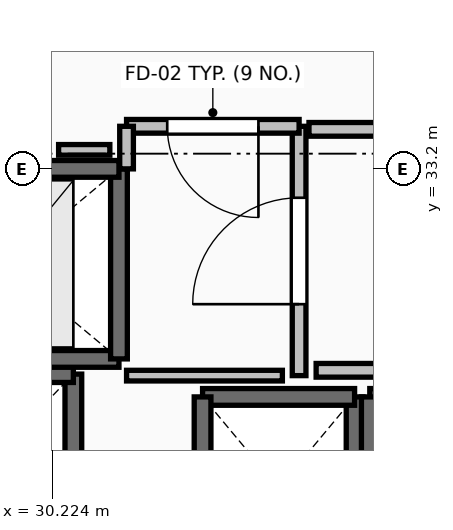
"""IFC4 building model, lengths in metres.
Left out: names, types, materials, properties, quantities, classifications, styles, units other than length and angle.
Written with IfcOpenShell. Run it as: python <this file> out.ifc"""

import sys

from ifc_helpers import new_model, si_unit, direction, frame, frame_2d, origin, place, context, subcontext, project, spatial, rectangle, extrude, element, fill, save


model = new_model("IFC4")
c1 = context("Model", 3, precision=1e-05, world=origin(), true_north=direction((0.0, 1.0)))
c2 = subcontext(c1, "Body", "Model", "MODEL_VIEW")
j1 = project(units=[si_unit("LENGTHUNIT", "METRE"), si_unit("PLANEANGLEUNIT", "RADIAN")], contexts=[c1])
p1 = place(None, origin())
s1 = spatial("IfcSite", under=j1, at=p1, CompositionType="ELEMENT")
p2 = place(p1, origin())
s2 = spatial("IfcBuilding", under=s1, at=p2, CompositionType="ELEMENT")
p3 = place(p2, frame((0.0, 0.0, 124.3)))
s3 = spatial("IfcBuildingStorey", under=s2, at=p3, CompositionType="ELEMENT", Elevation=124.3)
p4 = place(p3, frame((34.2, 27.8, 0.0), z_axis=(0.0, 0.0, 1.0), x_axis=(0.0, 1.0, 0.0)))
e1 = element("IfcWall", 1, at=p4, inside=s3, PredefinedType="SOLIDWALL", context=c2, shape_type="SweptSolid", body=[
    extrude(rectangle(XDim=2.4, YDim=0.22, at=frame_2d((1.2, 0.0))), origin(), (0.0, 0.0, 1.0), 4.54),
])
p5 = place(p3, frame((34.2, 30.2, 0.0), z_axis=(0.0, 0.0, 1.0), x_axis=(-1.0, 0.0, 0.0)))
e2 = element("IfcWall", 2, at=p5, inside=s3, PredefinedType="SOLIDWALL", context=c2, shape_type="SweptSolid", body=[
    extrude(rectangle(XDim=2.0, YDim=0.22, at=frame_2d((1.0, 0.0))), origin(), (0.0, 0.0, 1.0), 4.54),
])
p6 = place(p3, frame((32.2, 30.2, 0.0), z_axis=(0.0, 0.0, 1.0), x_axis=(0.0, -1.0, 0.0)))
e3 = element("IfcWall", 3, at=p6, inside=s3, PredefinedType="SOLIDWALL", context=c2, shape_type="SweptSolid", body=[
    extrude(rectangle(XDim=2.4, YDim=0.22, at=frame_2d((1.2, 0.0))), origin(), (0.0, 0.0, 1.0), 4.54),
])
p7 = place(p3, frame((36.4, 30.2, 0.0), z_axis=(0.0, 0.0, 1.0), x_axis=(-1.0, 0.0, 0.0)))
e4 = element("IfcWall", 4, at=p7, inside=s3, PredefinedType="SOLIDWALL", context=c2, shape_type="SweptSolid", body=[
    extrude(rectangle(XDim=2.0, YDim=0.22, at=frame_2d((1.0, 0.0))), origin(), (0.0, 0.0, 1.0), 4.54),
])
p8 = place(p3, frame((34.4, 30.2, 0.0), z_axis=(0.0, 0.0, 1.0), x_axis=(0.0, -1.0, 0.0)))
e5 = element("IfcWall", 5, at=p8, inside=s3, PredefinedType="SOLIDWALL", context=c2, shape_type="SweptSolid", body=[
    extrude(rectangle(XDim=2.4, YDim=0.22, at=frame_2d((1.2, 0.0))), origin(), (0.0, 0.0, 1.0), 4.54),
])
p9 = place(p3, frame((30.5, 28.0, 0.0), z_axis=(0.0, 0.0, 1.0), x_axis=(0.0, 1.0, 0.0)))
e6 = element("IfcWall", 6, at=p9, inside=s3, PredefinedType="SHEAR", context=c2, shape_type="SweptSolid", body=[
    extrude(rectangle(XDim=2.5, YDim=0.22, at=frame_2d((1.25, 0.0))), origin(), (0.0, 0.0, 1.0), 4.54),
])
p10 = place(p3, frame((30.5, 30.5, 0.0), z_axis=(0.0, 0.0, 1.0), x_axis=(-1.0, 0.0, 0.0)))
e7 = element("IfcWall", 7, at=p10, inside=s3, PredefinedType="SHEAR", context=c2, shape_type="SweptSolid", body=[
    extrude(rectangle(XDim=2.4, YDim=0.22, at=frame_2d((1.2, 0.0))), origin(), (0.0, 0.0, 1.0), 4.54),
])
p11 = place(p3, frame((28.1, 30.7, 0.0), z_axis=(0.0, 0.0, 1.0), x_axis=(1.0, 0.0, 0.0)))
e8 = element("IfcWall", 8, at=p11, inside=s3, PredefinedType="SOLIDWALL", context=c2, shape_type="SweptSolid", body=[
    extrude(rectangle(XDim=3.0, YDim=0.22, at=frame_2d((1.5, 0.0))), origin(), (0.0, 0.0, 1.0), 4.54),
])
p12 = place(p3, frame((31.1, 30.7, 0.0), z_axis=(0.0, 0.0, 1.0), x_axis=(0.0, 1.0, 0.0)))
e9 = element("IfcWall", 9, at=p12, inside=s3, PredefinedType="SOLIDWALL", context=c2, shape_type="SweptSolid", body=[
    extrude(rectangle(XDim=2.5, YDim=0.22, at=frame_2d((1.25, 0.0))), origin(), (0.0, 0.0, 1.0), 4.54),
])
p13 = place(p3, frame((31.1, 33.2, 0.0), z_axis=(0.0, 0.0, 1.0), x_axis=(-1.0, 0.0, 0.0)))
e10 = element("IfcWall", 10, at=p13, inside=s3, PredefinedType="SOLIDWALL", context=c2, shape_type="SweptSolid", body=[
    extrude(rectangle(XDim=3.0, YDim=0.22, at=frame_2d((1.5, 0.0))), origin(), (0.0, 0.0, 1.0), 4.54),
])
p14 = place(p13, frame((0.9, 0.0, 0.0)))
e11 = element("IfcOpeningElement", 11, at=p14, cuts=e10, PredefinedType="OPENING", context=c2, shape_type="SweptSolid", body=[
    extrude(rectangle(XDim=1.2, YDim=2.2, at=frame_2d((0.6, 1.1))), frame((0.0, 0.125, 0.0), z_axis=(0.0, -1.0, 0.0), x_axis=(1.0, 0.0, 0.0)), (0.0, 0.0, 1.0), 0.25),
])
p15 = place(p3, frame((33.47, 30.48, 0.0), z_axis=(0.0, 0.0, 1.0), x_axis=(0.0, 1.0, 0.0)))
e12 = element("IfcWall", 12, at=p15, inside=s3, PredefinedType="PARTITIONING", context=c2, shape_type="SweptSolid", body=[
    extrude(rectangle(XDim=3.28, YDim=0.18, at=frame_2d((1.64, 0.0))), origin(), (0.0, 0.0, 1.0), 4.54),
])
p16 = place(p15, frame((0.94, 0.0, 0.0)))
e13 = element("IfcOpeningElement", 13, at=p16, cuts=e12, PredefinedType="OPENING", context=c2, shape_type="SweptSolid", body=[
    extrude(rectangle(XDim=1.4, YDim=2.2, at=frame_2d((0.7, 1.1))), frame((0.0, 0.105, 0.0), z_axis=(0.0, -1.0, 0.0), x_axis=(1.0, 0.0, 0.0)), (0.0, 0.0, 1.0), 0.21),
])
p17 = place(p3, frame((33.47, 33.76, 0.0), z_axis=(0.0, 0.0, 1.0), x_axis=(-1.0, 0.0, 0.0)))
e14 = element("IfcWall", 14, at=p17, inside=s3, PredefinedType="PARTITIONING", context=c2, shape_type="SweptSolid", body=[
    extrude(rectangle(XDim=2.27, YDim=0.18, at=frame_2d((1.135, 0.0))), origin(), (0.0, 0.0, 1.0), 4.54),
])
p18 = place(p17, frame((0.535, 0.0, 0.0)))
e15 = element("IfcOpeningElement", 15, at=p18, cuts=e14, PredefinedType="OPENING", context=c2, shape_type="SweptSolid", body=[
    extrude(rectangle(XDim=1.2, YDim=2.15, at=frame_2d((0.6, 1.075))), frame((0.0, 0.105, 0.0), z_axis=(0.0, -1.0, 0.0), x_axis=(1.0, 0.0, 0.0)), (0.0, 0.0, 1.0), 0.21),
])
p19 = place(p3, frame((31.2, 33.76, 0.0), z_axis=(0.0, 0.0, 1.0), x_axis=(0.0, -1.0, 0.0)))
e16 = element("IfcWall", 16, at=p19, inside=s3, PredefinedType="PARTITIONING", context=c2, shape_type="SweptSolid", body=[
    extrude(rectangle(XDim=0.56, YDim=0.18, at=frame_2d((0.28, 0.0))), origin(), (0.0, 0.0, 1.0), 4.54),
])
p20 = place(p3, frame((38.8, 33.72, 0.0), z_axis=(0.0, 0.0, 1.0), x_axis=(-1.0, 0.0, 0.0)))
e17 = element("IfcWall", 17, at=p20, inside=s3, PredefinedType="PARTITIONING", context=c2, shape_type="SweptSolid", body=[
    extrude(rectangle(XDim=5.2, YDim=0.18, at=frame_2d((2.6, 0.0))), origin(), (0.0, 0.0, 1.0), 4.54),
])
p21 = place(p20, frame((1.9, 0.0, 0.0)))
e18 = element("IfcOpeningElement", 18, at=p21, cuts=e17, PredefinedType="OPENING", context=c2, shape_type="SweptSolid", body=[
    extrude(rectangle(XDim=1.4, YDim=2.2, at=frame_2d((0.7, 1.1))), frame((0.0, 0.105, 0.0), z_axis=(0.0, -1.0, 0.0), x_axis=(1.0, 0.0, 0.0)), (0.0, 0.0, 1.0), 0.21),
])
p22 = place(p3, frame((31.2, 30.48, 0.0), z_axis=(0.0, 0.0, 1.0), x_axis=(1.0, 0.0, 0.0)))
e19 = element("IfcWall", 19, at=p22, inside=s3, PredefinedType="PARTITIONING", context=c2, shape_type="SweptSolid", body=[
    extrude(rectangle(XDim=2.05, YDim=0.14, at=frame_2d((1.025, 0.0))), origin(), (0.0, 0.0, 1.0), 4.54),
])
p23 = place(p3, frame((33.694, 30.55, 0.0), z_axis=(0.0, 0.0, 1.0), x_axis=(1.0, 0.0, 0.0)))
e20 = element("IfcWall", 20, at=p23, inside=s3, PredefinedType="PARTITIONING", context=c2, shape_type="SweptSolid", body=[
    extrude(rectangle(XDim=2.745, YDim=0.18, at=frame_2d((1.373, 0.0))), origin(), (0.0, 0.0, 1.0), 3.522),
])
p24 = place(p3, frame((30.98, 33.45, 0.0), z_axis=(0.0, 0.0, 1.0), x_axis=(-1.0, 0.0, 0.0)))
e21 = element("IfcWall", 21, at=p24, inside=s3, PredefinedType="PARTITIONING", context=c2, shape_type="SweptSolid", body=[
    extrude(rectangle(XDim=0.674, YDim=0.14, at=frame_2d((0.337, 0.0))), origin(), (0.0, 0.0, 1.0), 4.54),
])
p25 = place(p16, origin())
e22 = element("IfcDoor", 22, at=p25, inside=s3, OperationType="DOUBLE_SWING_LEFT", PredefinedType="DOOR", context=c2, shape_type="SweptSolid", body=[
    extrude(rectangle(XDim=1.4, YDim=2.2, at=frame_2d((0.7, 1.1))), frame((0.0, 0.025, 0.0), z_axis=(0.0, -1.0, 0.0), x_axis=(1.0, 0.0, 0.0)), (0.0, 0.0, 1.0), 0.05),
])
fill(e13, e22)
p26 = place(p18, origin())
e23 = element("IfcDoor", 23, at=p26, inside=s3, OperationType="SINGLE_SWING_LEFT", PredefinedType="DOOR", context=c2, shape_type="SweptSolid", body=[
    extrude(rectangle(XDim=1.2, YDim=2.15, at=frame_2d((0.6, 1.075))), frame((0.0, 0.025, 0.0), z_axis=(0.0, -1.0, 0.0), x_axis=(1.0, 0.0, 0.0)), (0.0, 0.0, 1.0), 0.05),
])
fill(e15, e23)
save(model, sys.argv[1])
